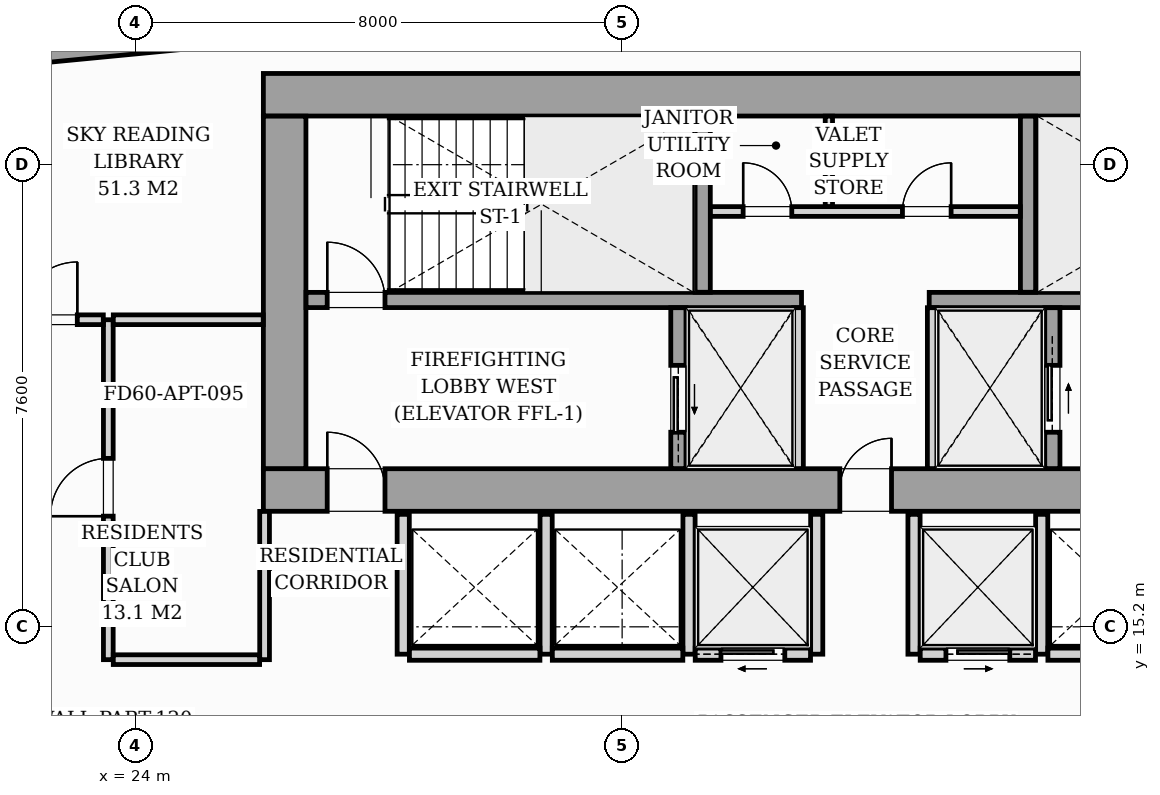
"""IFC4 building model, lengths in metres.
Left out: names, types, materials, properties, quantities, classifications, styles, units other than length and angle.
Written with IfcOpenShell. Run it as: python <this file> out.ifc"""

import sys

from ifc_helpers import new_model, si_unit, direction, frame, frame_2d, origin, origin_2d, place, context, subcontext, project, spatial, rectangle, i_section, extrude, source, transform, mapped, element, fill, save


model = new_model("IFC4")
c1 = context("Model", 3, precision=1e-05, world=origin(), true_north=direction((0.0, 1.0)))
c2 = subcontext(c1, "Body", "Model", "MODEL_VIEW")
j1 = project(units=[si_unit("LENGTHUNIT", "METRE"), si_unit("PLANEANGLEUNIT", "RADIAN")], contexts=[c1])
p1 = place(None, origin())
s1 = spatial("IfcSite", under=j1, at=p1, CompositionType="ELEMENT")
p2 = place(p1, origin())
s2 = spatial("IfcBuilding", under=s1, at=p2, CompositionType="ELEMENT")
p3 = place(p2, frame((0.0, 0.0, 100.2)))
s3 = spatial("IfcBuildingStorey", under=s2, at=p3, CompositionType="ELEMENT", Elevation=100.2)
m1 = source(origin(), c2, "Body", "SweptSolid", [
    extrude(i_section(OverallWidth=0.427, OverallDepth=0.483, WebThickness=0.051, FlangeThickness=0.082, FilletRadius=0.018, at=origin_2d()), origin(), (0.0, 0.0, 1.0), 3.196),
])
for number, where, z_axis, x_axis in (
    (1, (26.4, 17.4, 0.002), (0.0, 0.0, 1.0), (1.0, 0.0, 0.0)),
    (2, (33.12, 17.4, 0.002), (0.0, 0.0, 1.0), (1.0, 0.0, 0.0)),
    (3, (38.88, 17.4, 0.002), (0.0, 0.0, 1.0), (1.0, 0.0, 0.0)),
    (4, (26.4, 24.0, 0.002), (0.0, 0.0, 1.0), (1.0, 0.0, 0.0)),
    (5, (33.12, 24.0, 0.002), (0.0, 0.0, 1.0), (1.0, 0.0, 0.0)),
    (6, (38.88, 24.0, 0.002), (0.0, 0.0, 1.0), (1.0, 0.0, 0.0)),
):
    element("IfcColumn", number, at=place(p3, frame(where, z_axis=z_axis, x_axis=x_axis)), inside=s3, PredefinedType="PILASTER", context=c2, shape_type="MappedRepresentation", body=[
        mapped(m1, transform((0.0, 0.0, 0.0), scale=1.0)),
    ])
p4 = place(p3, frame((11.08, 23.508, 0.0), z_axis=(0.0, 0.0, 1.0), x_axis=(0.995396638587, 0.095841180552, 0.0)))
e7 = element("IfcWall", 7, at=p4, inside=s3, PredefinedType="STANDARD", context=c2, shape_type="SweptSolid", body=[
    extrude(rectangle(XDim=19.11, YDim=0.26, at=frame_2d((9.555, 0.0))), origin(), (0.0, 0.0, 1.0), 2.94),
])
p5 = place(p4, frame((7.107, 0.0, 0.0)))
e8 = element("IfcOpeningElement", 8, at=p5, cuts=e7, PredefinedType="OPENING", context=c2, shape_type="SweptSolid", body=[
    extrude(rectangle(XDim=1.8, YDim=2.06, at=frame_2d((0.9, 1.03))), frame((0.0, 0.14, 0.0), z_axis=(0.0, -1.0, 0.0), x_axis=(1.0, 0.0, 0.0)), (0.0, 0.0, 1.0), 0.28),
])
p6 = place(p4, frame((2.05, 0.0, 0.65)))
e9 = element("IfcOpeningElement", 9, at=p6, cuts=e7, PredefinedType="OPENING", context=c2, shape_type="SweptSolid", body=[
    extrude(rectangle(XDim=1.6, YDim=1.5, at=frame_2d((0.8, 0.75))), frame((0.0, 0.14, 0.0), z_axis=(0.0, -1.0, 0.0), x_axis=(1.0, 0.0, 0.0)), (0.0, 0.0, 1.0), 0.28),
])
p7 = place(p3, frame((26.1, 17.45, 0.0), z_axis=(0.0, 0.0, 1.0), x_axis=(1.0, 0.0, 0.0)))
e10 = element("IfcWall", 10, at=p7, inside=s3, PredefinedType="SHEAR", context=c2, shape_type="SweptSolid", body=[
    extrude(rectangle(XDim=19.8, YDim=0.7, at=frame_2d((9.9, 0.0))), origin(), (0.0, 0.0, 1.0), 3.2),
])
p8 = place(p7, frame((1.05, 0.0, 0.0)))
e11 = element("IfcOpeningElement", 11, at=p8, cuts=e10, PredefinedType="OPENING", context=c2, shape_type="SweptSolid", body=[
    extrude(rectangle(XDim=0.95, YDim=2.06, at=frame_2d((0.475, 1.03))), frame((0.0, 0.36, 0.0), z_axis=(0.0, -1.0, 0.0), x_axis=(1.0, 0.0, 0.0)), (0.0, 0.0, 1.0), 0.72),
])
p9 = place(p7, frame((9.48, 0.0, 0.0)))
e12 = element("IfcOpeningElement", 12, at=p9, cuts=e10, PredefinedType="OPENING", context=c2, shape_type="SweptSolid", body=[
    extrude(rectangle(XDim=0.85, YDim=2.0, at=frame_2d((0.425, 1.0))), frame((0.0, 0.36, 0.0), z_axis=(0.0, -1.0, 0.0), x_axis=(1.0, 0.0, 0.0)), (0.0, 0.0, 1.0), 0.72),
])
p10 = place(p7, frame((17.65, 0.0, 0.0)))
e13 = element("IfcOpeningElement", 13, at=p10, cuts=e10, PredefinedType="OPENING", context=c2, shape_type="SweptSolid", body=[
    extrude(rectangle(XDim=0.95, YDim=2.06, at=frame_2d((0.475, 1.03))), frame((0.0, 0.36, 0.0), z_axis=(0.0, -1.0, 0.0), x_axis=(1.0, 0.0, 0.0)), (0.0, 0.0, 1.0), 0.72),
])
p11 = place(p3, frame((26.1, 23.95, 0.0), z_axis=(0.0, 0.0, 1.0), x_axis=(1.0, 0.0, 0.0)))
e14 = element("IfcWall", 14, at=p11, inside=s3, PredefinedType="SHEAR", context=c2, shape_type="SweptSolid", body=[
    extrude(rectangle(XDim=19.8, YDim=0.7, at=frame_2d((9.9, 0.0))), origin(), (0.0, 0.0, 1.0), 3.2),
])
p12 = place(p3, frame((26.45, 17.802, 0.0), z_axis=(0.0, 0.0, 1.0), x_axis=(0.0, 1.0, 0.0)))
e15 = element("IfcWall", 15, at=p12, inside=s3, PredefinedType="SHEAR", context=c2, shape_type="SweptSolid", body=[
    extrude(rectangle(XDim=5.796, YDim=0.7, at=frame_2d((2.898, 0.0))), origin(), (0.0, 0.0, 1.0), 3.2),
])
p13 = place(p3, frame((26.802, 20.575, 0.0), z_axis=(0.0, 0.0, 1.0), x_axis=(1.0, 0.0, 0.0)))
e16 = element("IfcWall", 16, at=p13, inside=s3, PredefinedType="SOLIDWALL", context=c2, shape_type="SweptSolid", body=[
    extrude(rectangle(XDim=8.148, YDim=0.25, at=frame_2d((4.074, 0.0))), origin(), (0.0, 0.0, 1.0), 3.2),
])
p14 = place(p13, frame((0.348, 0.0, 0.0)))
e17 = element("IfcOpeningElement", 17, at=p14, cuts=e16, PredefinedType="OPENING", context=c2, shape_type="SweptSolid", body=[
    extrude(rectangle(XDim=0.95, YDim=2.06, at=frame_2d((0.475, 1.03))), frame((0.0, 0.135, 0.0), z_axis=(0.0, -1.0, 0.0), x_axis=(1.0, 0.0, 0.0)), (0.0, 0.0, 1.0), 0.27),
])
p15 = place(p3, frame((37.05, 20.575, 0.0), z_axis=(0.0, 0.0, 1.0), x_axis=(1.0, 0.0, 0.0)))
e18 = element("IfcWall", 18, at=p15, inside=s3, PredefinedType="SOLIDWALL", context=c2, shape_type="SweptSolid", body=[
    extrude(rectangle(XDim=8.148, YDim=0.25, at=frame_2d((4.074, 0.0))), origin(), (0.0, 0.0, 1.0), 3.2),
])
p16 = place(p15, frame((6.6, 0.0, 0.0)))
e19 = element("IfcOpeningElement", 19, at=p16, cuts=e18, PredefinedType="OPENING", context=c2, shape_type="SweptSolid", body=[
    extrude(rectangle(XDim=0.95, YDim=2.06, at=frame_2d((0.475, 1.03))), frame((0.0, 0.135, 0.0), z_axis=(0.0, -1.0, 0.0), x_axis=(1.0, 0.0, 0.0)), (0.0, 0.0, 1.0), 0.27),
])
for number, where, z_axis, x_axis in (
    (20, (33.325, 20.702, 0.0), (0.0, 0.0, 1.0), (0.0, 1.0, 0.0)),
    (21, (38.675, 20.702, 0.0), (0.0, 0.0, 1.0), (0.0, 1.0, 0.0)),
):
    element("IfcWall", number, at=place(p3, frame(where, z_axis=z_axis, x_axis=x_axis)), inside=s3, PredefinedType="SOLIDWALL", context=c2, shape_type="SweptSolid", body=[
        extrude(rectangle(XDim=2.896, YDim=0.25, at=frame_2d((1.448, 0.0))), origin(), (0.0, 0.0, 1.0), 3.2),
    ])
p17 = place(p3, frame((32.925, 17.802, 0.0), z_axis=(0.0, 0.0, 1.0), x_axis=(0.0, 1.0, 0.0)))
e22 = element("IfcWall", 22, at=p17, inside=s3, PredefinedType="SOLIDWALL", context=c2, shape_type="SweptSolid", body=[
    extrude(rectangle(XDim=2.646, YDim=0.25, at=frame_2d((1.323, 0.0))), origin(), (0.0, 0.0, 1.0), 3.2),
])
p18 = place(p17, frame((0.598, 0.0, 0.0)))
e23 = element("IfcOpeningElement", 23, at=p18, cuts=e22, PredefinedType="OPENING", context=c2, shape_type="SweptSolid", body=[
    extrude(rectangle(XDim=1.1, YDim=2.08, at=frame_2d((0.55, 1.04))), frame((0.0, 0.135, 0.0), z_axis=(0.0, -1.0, 0.0), x_axis=(1.0, 0.0, 0.0)), (0.0, 0.0, 1.0), 0.27),
])
for number, where, z_axis, x_axis in (
    (24, (34.9, 17.802, 0.0), (0.0, 0.0, 1.0), (0.0, 1.0, 0.0)),
    (25, (37.1, 17.802, 0.0), (0.0, 0.0, 1.0), (0.0, 1.0, 0.0)),
):
    element("IfcWall", number, at=place(p3, frame(where, z_axis=z_axis, x_axis=x_axis)), inside=s3, PredefinedType="PARTITIONING", context=c2, shape_type="SweptSolid", body=[
        extrude(rectangle(XDim=2.646, YDim=0.16, at=frame_2d((1.323, 0.0))), origin(), (0.0, 0.0, 1.0), 2.94),
    ])
p19 = place(p3, frame((39.075, 17.802, 0.0), z_axis=(0.0, 0.0, 1.0), x_axis=(0.0, 1.0, 0.0)))
e26 = element("IfcWall", 26, at=p19, inside=s3, PredefinedType="SOLIDWALL", context=c2, shape_type="SweptSolid", body=[
    extrude(rectangle(XDim=2.646, YDim=0.25, at=frame_2d((1.323, 0.0))), origin(), (0.0, 0.0, 1.0), 3.2),
])
p20 = place(p19, frame((0.598, 0.0, 0.0)))
e27 = element("IfcOpeningElement", 27, at=p20, cuts=e26, PredefinedType="OPENING", context=c2, shape_type="SweptSolid", body=[
    extrude(rectangle(XDim=1.1, YDim=2.08, at=frame_2d((0.55, 1.04))), frame((0.0, 0.135, 0.0), z_axis=(0.0, -1.0, 0.0), x_axis=(1.0, 0.0, 0.0)), (0.0, 0.0, 1.0), 0.27),
])
p21 = place(p3, frame((33.452, 22.03, 0.0), z_axis=(0.0, 0.0, 1.0), x_axis=(1.0, 0.0, 0.0)))
e28 = element("IfcWall", 28, at=p21, inside=s3, PredefinedType="PARTITIONING", context=c2, shape_type="SweptSolid", body=[
    extrude(rectangle(XDim=5.096, YDim=0.16, at=frame_2d((2.548, 0.0))), origin(), (0.0, 0.0, 1.0), 2.94),
])
p22 = place(p21, frame((0.538, 0.0, 0.0)))
e29 = element("IfcOpeningElement", 29, at=p22, cuts=e28, PredefinedType="OPENING", context=c2, shape_type="SweptSolid", body=[
    extrude(rectangle(XDim=0.8, YDim=2.05, at=frame_2d((0.4, 1.025))), frame((0.0, 0.09, 0.0), z_axis=(0.0, -1.0, 0.0), x_axis=(1.0, 0.0, 0.0)), (0.0, 0.0, 1.0), 0.18),
])
p23 = place(p21, frame((3.158, 0.0, 0.0)))
e30 = element("IfcOpeningElement", 30, at=p23, cuts=e28, PredefinedType="OPENING", context=c2, shape_type="SweptSolid", body=[
    extrude(rectangle(XDim=0.8, YDim=2.05, at=frame_2d((0.4, 1.025))), frame((0.0, 0.09, 0.0), z_axis=(0.0, -1.0, 0.0), x_axis=(1.0, 0.0, 0.0)), (0.0, 0.0, 1.0), 0.18),
])
p24 = place(p3, frame((35.4, 22.112, 0.0), z_axis=(0.0, 0.0, 1.0), x_axis=(0.0, 1.0, 0.0)))
e31 = element("IfcWall", 31, at=p24, inside=s3, PredefinedType="PARTITIONING", context=c2, shape_type="SweptSolid", body=[
    extrude(rectangle(XDim=1.486, YDim=0.12, at=frame_2d((0.743, 0.0))), origin(), (0.0, 0.0, 1.0), 2.94),
])
for number, where, z_axis, x_axis in (
    (32, (28.4, 14.75, 0.0), (0.0, 0.0, 1.0), (0.0, 1.0, 0.0)),
    (33, (30.75, 14.75, 0.0), (0.0, 0.0, 1.0), (0.0, 1.0, 0.0)),
    (34, (33.1, 14.75, 0.0), (0.0, 0.0, 1.0), (0.0, 1.0, 0.0)),
):
    element("IfcWall", number, at=place(p3, frame(where, z_axis=z_axis, x_axis=x_axis)), inside=s3, PredefinedType="PARTITIONING", context=c2, shape_type="SweptSolid", body=[
        extrude(rectangle(XDim=2.3, YDim=0.2, at=frame_2d((1.15, 0.0))), origin(), (0.0, 0.0, 1.0), 2.94),
    ])
for number, where, z_axis, x_axis in (
    (35, (28.502, 14.75, 0.0), (0.0, 0.0, 1.0), (1.0, 0.0, 0.0)),
    (36, (30.852, 14.75, 0.0), (0.0, 0.0, 1.0), (1.0, 0.0, 0.0)),
):
    element("IfcWall", number, at=place(p3, frame(where, z_axis=z_axis, x_axis=x_axis)), inside=s3, PredefinedType="PARTITIONING", context=c2, shape_type="SweptSolid", body=[
        extrude(rectangle(XDim=2.146, YDim=0.2, at=frame_2d((1.073, 0.0))), origin(), (0.0, 0.0, 1.0), 2.94),
    ])
p25 = place(p3, frame((35.2, 14.75, 0.0), z_axis=(0.0, 0.0, 1.0), x_axis=(0.0, 1.0, 0.0)))
e37 = element("IfcWall", 37, at=p25, inside=s3, PredefinedType="PARTITIONING", context=c2, shape_type="SweptSolid", body=[
    extrude(rectangle(XDim=2.3, YDim=0.2, at=frame_2d((1.15, 0.0))), origin(), (0.0, 0.0, 1.0), 2.94),
])
p26 = place(p3, frame((33.202, 14.75, 0.0), z_axis=(0.0, 0.0, 1.0), x_axis=(1.0, 0.0, 0.0)))
e38 = element("IfcWall", 38, at=p26, inside=s3, PredefinedType="PARTITIONING", context=c2, shape_type="SweptSolid", body=[
    extrude(rectangle(XDim=1.896, YDim=0.2, at=frame_2d((0.948, 0.0))), origin(), (0.0, 0.0, 1.0), 2.94),
])
p27 = place(p26, frame((0.423, 0.0, 0.0)))
e39 = element("IfcOpeningElement", 39, at=p27, cuts=e38, PredefinedType="OPENING", context=c2, shape_type="SweptSolid", body=[
    extrude(rectangle(XDim=1.05, YDim=2.08, at=frame_2d((0.525, 1.04))), frame((0.0, 0.11, 0.0), z_axis=(0.0, -1.0, 0.0), x_axis=(1.0, 0.0, 0.0)), (0.0, 0.0, 1.0), 0.22),
])
for number, where, z_axis, x_axis in (
    (40, (36.8, 14.75, 0.0), (0.0, 0.0, 1.0), (0.0, 1.0, 0.0)),
    (41, (38.9, 14.75, 0.0), (0.0, 0.0, 1.0), (0.0, 1.0, 0.0)),
):
    element("IfcWall", number, at=place(p3, frame(where, z_axis=z_axis, x_axis=x_axis)), inside=s3, PredefinedType="PARTITIONING", context=c2, shape_type="SweptSolid", body=[
        extrude(rectangle(XDim=2.3, YDim=0.2, at=frame_2d((1.15, 0.0))), origin(), (0.0, 0.0, 1.0), 2.94),
    ])
p28 = place(p3, frame((36.902, 14.75, 0.0), z_axis=(0.0, 0.0, 1.0), x_axis=(1.0, 0.0, 0.0)))
e42 = element("IfcWall", 42, at=p28, inside=s3, PredefinedType="PARTITIONING", context=c2, shape_type="SweptSolid", body=[
    extrude(rectangle(XDim=1.896, YDim=0.2, at=frame_2d((0.948, 0.0))), origin(), (0.0, 0.0, 1.0), 2.94),
])
p29 = place(p28, frame((0.423, 0.0, 0.0)))
e43 = element("IfcOpeningElement", 43, at=p29, cuts=e42, PredefinedType="OPENING", context=c2, shape_type="SweptSolid", body=[
    extrude(rectangle(XDim=1.05, YDim=2.08, at=frame_2d((0.525, 1.04))), frame((0.0, 0.11, 0.0), z_axis=(0.0, -1.0, 0.0), x_axis=(1.0, 0.0, 0.0)), (0.0, 0.0, 1.0), 0.22),
])
p30 = place(p3, frame((39.002, 14.75, 0.0), z_axis=(0.0, 0.0, 1.0), x_axis=(1.0, 0.0, 0.0)))
e44 = element("IfcWall", 44, at=p30, inside=s3, PredefinedType="PARTITIONING", context=c2, shape_type="SweptSolid", body=[
    extrude(rectangle(XDim=2.146, YDim=0.2, at=frame_2d((1.073, 0.0))), origin(), (0.0, 0.0, 1.0), 2.94),
])
p31 = place(p3, frame((23.55, 14.66, 0.0), z_axis=(0.0, 0.0, 1.0), x_axis=(0.0, 1.0, 0.0)))
e45 = element("IfcWall", 45, at=p31, inside=s3, PredefinedType="PARTITIONING", context=c2, shape_type="SweptSolid", body=[
    extrude(rectangle(XDim=5.59, YDim=0.16, at=frame_2d((2.795, 0.0))), origin(), (0.0, 0.0, 1.0), 2.94),
])
p32 = place(p31, frame((2.36, 0.0, 0.0)))
e46 = element("IfcOpeningElement", 46, at=p32, cuts=e45, PredefinedType="OPENING", context=c2, shape_type="SweptSolid", body=[
    extrude(rectangle(XDim=0.95, YDim=2.06, at=frame_2d((0.475, 1.03))), frame((0.0, 0.09, 0.0), z_axis=(0.0, -1.0, 0.0), x_axis=(1.0, 0.0, 0.0)), (0.0, 0.0, 1.0), 0.18),
])
p33 = place(p3, frame((21.582, 20.25, 0.0), z_axis=(0.0, 0.0, 1.0), x_axis=(1.0, 0.0, 0.0)))
e47 = element("IfcWall", 47, at=p33, inside=s3, PredefinedType="PARTITIONING", context=c2, shape_type="SweptSolid", body=[
    extrude(rectangle(XDim=1.886, YDim=0.16, at=frame_2d((0.943, 0.0))), origin(), (0.0, 0.0, 1.0), 2.94),
])
p34 = place(p33, frame((0.508, 0.0, 0.0)))
e48 = element("IfcOpeningElement", 48, at=p34, cuts=e47, PredefinedType="OPENING", context=c2, shape_type="SweptSolid", body=[
    extrude(rectangle(XDim=0.95, YDim=2.06, at=frame_2d((0.475, 1.03))), frame((0.0, 0.09, 0.0), z_axis=(0.0, -1.0, 0.0), x_axis=(1.0, 0.0, 0.0)), (0.0, 0.0, 1.0), 0.18),
])
p35 = place(p3, frame((23.632, 20.25, 0.0), z_axis=(0.0, 0.0, 1.0), x_axis=(1.0, 0.0, 0.0)))
e49 = element("IfcWall", 49, at=p35, inside=s3, PredefinedType="PARTITIONING", context=c2, shape_type="SweptSolid", body=[
    extrude(rectangle(XDim=2.466, YDim=0.16, at=frame_2d((1.233, 0.0))), origin(), (0.0, 0.0, 1.0), 2.94),
])
p36 = place(p3, frame((26.12, 14.66, 0.0), z_axis=(0.0, 0.0, 1.0), x_axis=(0.0, 1.0, 0.0)))
e50 = element("IfcWall", 50, at=p36, inside=s3, PredefinedType="PARTITIONING", context=c2, shape_type="SweptSolid", body=[
    extrude(rectangle(XDim=2.438, YDim=0.16, at=frame_2d((1.219, 0.0))), origin(), (0.0, 0.0, 1.0), 2.94),
])
p37 = place(p3, frame((23.632, 14.66, 0.0), z_axis=(0.0, 0.0, 1.0), x_axis=(1.0, 0.0, 0.0)))
e51 = element("IfcWall", 51, at=p37, inside=s3, PredefinedType="PARTITIONING", context=c2, shape_type="SweptSolid", body=[
    extrude(rectangle(XDim=2.406, YDim=0.16, at=frame_2d((1.203, 0.0))), origin(), (0.0, 0.0, 1.0), 2.94),
])
m2 = source(origin(), c2, "Body", "SweptSolid", [
    extrude(rectangle(XDim=0.95, YDim=2.06, at=frame_2d((0.475, 1.03))), frame((0.0, 0.025, 0.0), z_axis=(0.0, -1.0, 0.0), x_axis=(1.0, 0.0, 0.0)), (0.0, 0.0, 1.0), 0.05),
])
p38 = place(p8, origin())
e52 = element("IfcDoor", 52, at=p38, inside=s3, OperationType="SINGLE_SWING_LEFT", PredefinedType="DOOR", context=c2, shape_type="MappedRepresentation", body=[
    mapped(m2, transform((0.0, 0.0, 0.0), scale=1.0)),
])
fill(e11, e52)
m3 = source(origin(), c2, "Body", "SweptSolid", [
    extrude(rectangle(XDim=0.85, YDim=2.0, at=frame_2d((0.425, 1.0))), frame((0.0, 0.025, 0.0), z_axis=(0.0, -1.0, 0.0), x_axis=(1.0, 0.0, 0.0)), (0.0, 0.0, 1.0), 0.05),
])
p39 = place(p9, origin())
e53 = element("IfcDoor", 53, at=p39, inside=s3, OperationType="SINGLE_SWING_RIGHT", PredefinedType="DOOR", context=c2, shape_type="MappedRepresentation", body=[
    mapped(m3, transform((0.0, 0.0, 0.0), scale=1.0)),
])
fill(e12, e53)
p40 = place(p14, origin())
e54 = element("IfcDoor", 54, at=p40, inside=s3, OperationType="SINGLE_SWING_LEFT", PredefinedType="DOOR", context=c2, shape_type="MappedRepresentation", body=[
    mapped(m2, transform((0.0, 0.0, 0.0), scale=1.0)),
])
fill(e17, e54)
m4 = source(origin(), c2, "Body", "SweptSolid", [
    extrude(rectangle(XDim=1.1, YDim=2.08, at=frame_2d((0.55, 1.04))), frame((0.0, 0.025, 0.0), z_axis=(0.0, -1.0, 0.0), x_axis=(1.0, 0.0, 0.0)), (0.0, 0.0, 1.0), 0.05),
])
p41 = place(p18, origin())
e55 = element("IfcDoor", 55, at=p41, inside=s3, OperationType="SLIDING_TO_LEFT", PredefinedType="DOOR", context=c2, shape_type="MappedRepresentation", body=[
    mapped(m4, transform((0.0, 0.0, 0.0), scale=1.0)),
])
fill(e23, e55)
p42 = place(p20, origin())
e56 = element("IfcDoor", 56, at=p42, inside=s3, OperationType="SLIDING_TO_RIGHT", PredefinedType="DOOR", context=c2, shape_type="MappedRepresentation", body=[
    mapped(m4, transform((0.0, 0.0, 0.0), scale=1.0)),
])
fill(e27, e56)
m5 = source(origin(), c2, "Body", "SweptSolid", [
    extrude(rectangle(XDim=0.8, YDim=2.05, at=frame_2d((0.4, 1.025))), frame((0.0, 0.025, 0.0), z_axis=(0.0, -1.0, 0.0), x_axis=(1.0, 0.0, 0.0)), (0.0, 0.0, 1.0), 0.05),
])
p43 = place(p22, origin())
e57 = element("IfcDoor", 57, at=p43, inside=s3, OperationType="SINGLE_SWING_LEFT", PredefinedType="DOOR", context=c2, shape_type="MappedRepresentation", body=[
    mapped(m5, transform((0.0, 0.0, 0.0), scale=1.0)),
])
fill(e29, e57)
p44 = place(p23, origin())
e58 = element("IfcDoor", 58, at=p44, inside=s3, OperationType="SINGLE_SWING_RIGHT", PredefinedType="DOOR", context=c2, shape_type="MappedRepresentation", body=[
    mapped(m5, transform((0.0, 0.0, 0.0), scale=1.0)),
])
fill(e30, e58)
m6 = source(origin(), c2, "Body", "SweptSolid", [
    extrude(rectangle(XDim=1.05, YDim=2.08, at=frame_2d((0.525, 1.04))), frame((0.0, 0.025, 0.0), z_axis=(0.0, -1.0, 0.0), x_axis=(1.0, 0.0, 0.0)), (0.0, 0.0, 1.0), 0.05),
])
p45 = place(p27, origin())
e59 = element("IfcDoor", 59, at=p45, inside=s3, OperationType="SLIDING_TO_LEFT", PredefinedType="DOOR", context=c2, shape_type="MappedRepresentation", body=[
    mapped(m6, transform((0.0, 0.0, 0.0), scale=1.0)),
])
fill(e39, e59)
p46 = place(p29, origin())
e60 = element("IfcDoor", 60, at=p46, inside=s3, OperationType="SLIDING_TO_RIGHT", PredefinedType="DOOR", context=c2, shape_type="MappedRepresentation", body=[
    mapped(m6, transform((0.0, 0.0, 0.0), scale=1.0)),
])
fill(e43, e60)
m7 = source(origin(), c2, "Body", "SweptSolid", [
    extrude(rectangle(XDim=0.95, YDim=2.06, at=frame_2d((0.475, 1.03))), frame((0.0, 0.025, 0.0), z_axis=(0.0, -1.0, 0.0), x_axis=(1.0, 0.0, 0.0)), (0.0, 0.0, 1.0), 0.05),
])
p47 = place(p32, origin())
e61 = element("IfcDoor", 61, at=p47, inside=s3, OperationType="SINGLE_SWING_LEFT", PredefinedType="DOOR", context=c2, shape_type="MappedRepresentation", body=[
    mapped(m7, transform((0.0, 0.0, 0.0), scale=1.0)),
])
fill(e46, e61)
p48 = place(p34, origin())
e62 = element("IfcDoor", 62, at=p48, inside=s3, OperationType="SINGLE_SWING_RIGHT", PredefinedType="DOOR", context=c2, shape_type="MappedRepresentation", body=[
    mapped(m7, transform((0.0, 0.0, 0.0), scale=1.0)),
])
fill(e48, e62)
save(model, sys.argv[1])
